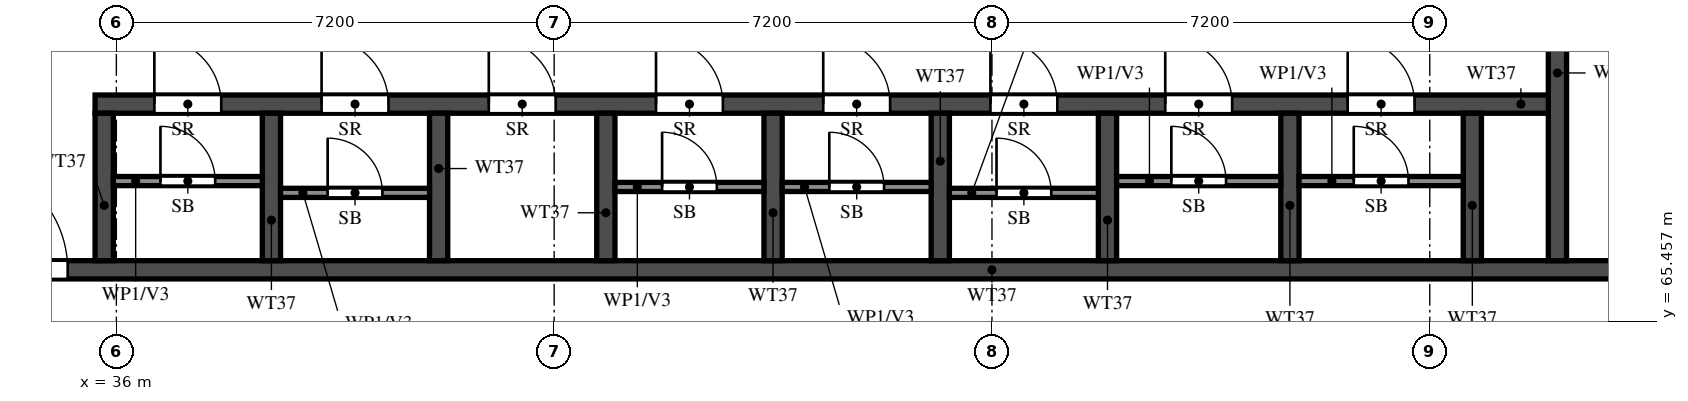
"""IFC4 building model, lengths in metres.
Left out: names, types, materials, properties, quantities, classifications, styles, units other than length and angle.
Written with IfcOpenShell. Run it as: python <this file> out.ifc"""

import sys

from ifc_helpers import new_model, si_unit, direction, frame, frame_2d, origin, place, context, subcontext, project, spatial, rectangle, extrude, element, fill, save


model = new_model("IFC4")
c1 = context("Model", 3, precision=1e-05, world=origin(), true_north=direction((0.0, 1.0)))
c2 = subcontext(c1, "Body", "Model", "MODEL_VIEW")
j1 = project(units=[si_unit("LENGTHUNIT", "METRE"), si_unit("PLANEANGLEUNIT", "RADIAN")], contexts=[c1])
p1 = place(None, origin())
s1 = spatial("IfcSite", under=j1, at=p1, CompositionType="ELEMENT")
p2 = place(p1, origin())
s2 = spatial("IfcBuilding", under=s1, at=p2, CompositionType="ELEMENT")
p3 = place(p2, frame((0.0, 0.0, 232.5)))
s3 = spatial("IfcBuildingStorey", under=s2, at=p3, CompositionType="ELEMENT", Elevation=232.5)
p4 = place(p3, frame((29.2, 66.3, 0.0), z_axis=(0.0, 0.0, 1.0), x_axis=(1.0, 0.0, 0.0)))
e1 = element("IfcWall", 1, at=p4, inside=s3, PredefinedType="SHEAR", context=c2, shape_type="SweptSolid", body=[
    extrude(rectangle(XDim=42.4, YDim=0.3, at=frame_2d((21.2, 0.0))), origin(), (0.0, 0.0, 1.0), 3.22),
])
p5 = place(p4, frame((1.425, 0.0, 0.0)))
e2 = element("IfcOpeningElement", 2, at=p5, cuts=e1, PredefinedType="OPENING", context=c2, shape_type="SweptSolid", body=[
    extrude(rectangle(XDim=1.1, YDim=2.1, at=frame_2d((0.55, 1.05))), frame((0.0, 0.16, 0.0), z_axis=(0.0, -1.0, 0.0), x_axis=(1.0, 0.0, 0.0)), (0.0, 0.0, 1.0), 0.32),
])
p6 = place(p4, frame((4.2, 0.0, 0.0)))
e3 = element("IfcOpeningElement", 3, at=p6, cuts=e1, PredefinedType="OPENING", context=c2, shape_type="SweptSolid", body=[
    extrude(rectangle(XDim=1.8, YDim=2.1, at=frame_2d((0.9, 1.05))), frame((0.0, 0.16, 0.0), z_axis=(0.0, -1.0, 0.0), x_axis=(1.0, 0.0, 0.0)), (0.0, 0.0, 1.0), 0.32),
])
p7 = place(p3, frame((35.65, 69.025, 0.0), z_axis=(0.0, 0.0, 1.0), x_axis=(1.0, 0.0, 0.0)))
e4 = element("IfcWall", 4, at=p7, inside=s3, PredefinedType="SHEAR", context=c2, shape_type="SweptSolid", body=[
    extrude(rectangle(XDim=24.05, YDim=0.3, at=frame_2d((12.025, 0.0))), origin(), (0.0, 0.0, 1.0), 3.22),
])
p8 = place(p7, frame((0.975, 0.0, 0.0)))
e5 = element("IfcOpeningElement", 5, at=p8, cuts=e4, PredefinedType="OPENING", context=c2, shape_type="SweptSolid", body=[
    extrude(rectangle(XDim=1.1, YDim=2.1, at=frame_2d((0.55, 1.05))), frame((0.0, 0.16, 0.0), z_axis=(0.0, -1.0, 0.0), x_axis=(1.0, 0.0, 0.0)), (0.0, 0.0, 1.0), 0.32),
])
p9 = place(p7, frame((3.725, 0.0, 0.0)))
e6 = element("IfcOpeningElement", 6, at=p9, cuts=e4, PredefinedType="OPENING", context=c2, shape_type="SweptSolid", body=[
    extrude(rectangle(XDim=1.1, YDim=2.1, at=frame_2d((0.55, 1.05))), frame((0.0, 0.16, 0.0), z_axis=(0.0, -1.0, 0.0), x_axis=(1.0, 0.0, 0.0)), (0.0, 0.0, 1.0), 0.32),
])
p10 = place(p7, frame((6.475, 0.0, 0.0)))
e7 = element("IfcOpeningElement", 7, at=p10, cuts=e4, PredefinedType="OPENING", context=c2, shape_type="SweptSolid", body=[
    extrude(rectangle(XDim=1.1, YDim=2.1, at=frame_2d((0.55, 1.05))), frame((0.0, 0.16, 0.0), z_axis=(0.0, -1.0, 0.0), x_axis=(1.0, 0.0, 0.0)), (0.0, 0.0, 1.0), 0.32),
])
p11 = place(p7, frame((9.225, 0.0, 0.0)))
e8 = element("IfcOpeningElement", 8, at=p11, cuts=e4, PredefinedType="OPENING", context=c2, shape_type="SweptSolid", body=[
    extrude(rectangle(XDim=1.1, YDim=2.1, at=frame_2d((0.55, 1.05))), frame((0.0, 0.16, 0.0), z_axis=(0.0, -1.0, 0.0), x_axis=(1.0, 0.0, 0.0)), (0.0, 0.0, 1.0), 0.32),
])
p12 = place(p7, frame((11.975, 0.0, 0.0)))
e9 = element("IfcOpeningElement", 9, at=p12, cuts=e4, PredefinedType="OPENING", context=c2, shape_type="SweptSolid", body=[
    extrude(rectangle(XDim=1.1, YDim=2.1, at=frame_2d((0.55, 1.05))), frame((0.0, 0.16, 0.0), z_axis=(0.0, -1.0, 0.0), x_axis=(1.0, 0.0, 0.0)), (0.0, 0.0, 1.0), 0.32),
])
p13 = place(p7, frame((14.725, 0.0, 0.0)))
e10 = element("IfcOpeningElement", 10, at=p13, cuts=e4, PredefinedType="OPENING", context=c2, shape_type="SweptSolid", body=[
    extrude(rectangle(XDim=1.1, YDim=2.1, at=frame_2d((0.55, 1.05))), frame((0.0, 0.16, 0.0), z_axis=(0.0, -1.0, 0.0), x_axis=(1.0, 0.0, 0.0)), (0.0, 0.0, 1.0), 0.32),
])
p14 = place(p7, frame((17.6, 0.0, 0.0)))
e11 = element("IfcOpeningElement", 11, at=p14, cuts=e4, PredefinedType="OPENING", context=c2, shape_type="SweptSolid", body=[
    extrude(rectangle(XDim=1.1, YDim=2.1, at=frame_2d((0.55, 1.05))), frame((0.0, 0.16, 0.0), z_axis=(0.0, -1.0, 0.0), x_axis=(1.0, 0.0, 0.0)), (0.0, 0.0, 1.0), 0.32),
])
p15 = place(p7, frame((20.6, 0.0, 0.0)))
e12 = element("IfcOpeningElement", 12, at=p15, cuts=e4, PredefinedType="OPENING", context=c2, shape_type="SweptSolid", body=[
    extrude(rectangle(XDim=1.1, YDim=2.1, at=frame_2d((0.55, 1.05))), frame((0.0, 0.16, 0.0), z_axis=(0.0, -1.0, 0.0), x_axis=(1.0, 0.0, 0.0)), (0.0, 0.0, 1.0), 0.32),
])
p16 = place(p3, frame((59.7, 66.45, 0.0), z_axis=(0.0, 0.0, 1.0), x_axis=(0.0, 1.0, 0.0)))
e13 = element("IfcWall", 13, at=p16, inside=s3, PredefinedType="SHEAR", context=c2, shape_type="SweptSolid", body=[
    extrude(rectangle(XDim=6.175, YDim=0.3, at=frame_2d((3.087, 0.0))), origin(), (0.0, 0.0, 1.0), 3.22),
])
p17 = place(p16, frame((3.85, 0.0, 0.0)))
e14 = element("IfcOpeningElement", 14, at=p17, cuts=e13, PredefinedType="OPENING", context=c2, shape_type="SweptSolid", body=[
    extrude(rectangle(XDim=1.2, YDim=2.1, at=frame_2d((0.6, 1.05))), frame((0.0, 0.16, 0.0), z_axis=(0.0, -1.0, 0.0), x_axis=(1.0, 0.0, 0.0)), (0.0, 0.0, 1.0), 0.32),
])
for number, where, z_axis, x_axis in (
    (15, (35.8, 66.45, 0.0), (0.0, 0.0, 1.0), (0.0, 1.0, 0.0)),
    (16, (38.55, 66.45, 0.0), (0.0, 0.0, 1.0), (0.0, 1.0, 0.0)),
    (17, (41.3, 66.45, 0.0), (0.0, 0.0, 1.0), (0.0, 1.0, 0.0)),
    (18, (44.05, 66.45, 0.0), (0.0, 0.0, 1.0), (0.0, 1.0, 0.0)),
    (19, (46.8, 66.45, 0.0), (0.0, 0.0, 1.0), (0.0, 1.0, 0.0)),
    (20, (49.55, 66.45, 0.0), (0.0, 0.0, 1.0), (0.0, 1.0, 0.0)),
    (21, (52.3, 66.45, 0.0), (0.0, 0.0, 1.0), (0.0, 1.0, 0.0)),
    (22, (55.3, 66.45, 0.0), (0.0, 0.0, 1.0), (0.0, 1.0, 0.0)),
    (23, (58.3, 66.45, 0.0), (0.0, 0.0, 1.0), (0.0, 1.0, 0.0)),
):
    element("IfcWall", number, at=place(p3, frame(where, z_axis=z_axis, x_axis=x_axis)), inside=s3, PredefinedType="SHEAR", context=c2, shape_type="SweptSolid", body=[
        extrude(rectangle(XDim=2.425, YDim=0.3, at=frame_2d((1.212, 0.0))), origin(), (0.0, 0.0, 1.0), 3.22),
    ])
p18 = place(p3, frame((35.95, 67.76, 0.0), z_axis=(0.0, 0.0, 1.0), x_axis=(1.0, 0.0, 0.0)))
e24 = element("IfcWall", 24, at=p18, inside=s3, PredefinedType="PARTITIONING", context=c2, shape_type="SweptSolid", body=[
    extrude(rectangle(XDim=2.45, YDim=0.15, at=frame_2d((1.225, 0.0))), origin(), (0.0, 0.0, 1.0), 3.22),
])
p19 = place(p18, frame((0.775, 0.0, 0.0)))
e25 = element("IfcOpeningElement", 25, at=p19, cuts=e24, PredefinedType="OPENING", context=c2, shape_type="SweptSolid", body=[
    extrude(rectangle(XDim=0.9, YDim=2.1, at=frame_2d((0.45, 1.05))), frame((0.0, 0.085, 0.0), z_axis=(0.0, -1.0, 0.0), x_axis=(1.0, 0.0, 0.0)), (0.0, 0.0, 1.0), 0.17),
])
p20 = place(p3, frame((38.7, 67.565, 0.0), z_axis=(0.0, 0.0, 1.0), x_axis=(1.0, 0.0, 0.0)))
e26 = element("IfcWall", 26, at=p20, inside=s3, PredefinedType="PARTITIONING", context=c2, shape_type="SweptSolid", body=[
    extrude(rectangle(XDim=2.45, YDim=0.15, at=frame_2d((1.225, 0.0))), origin(), (0.0, 0.0, 1.0), 3.22),
])
p21 = place(p20, frame((0.775, 0.0, 0.0)))
e27 = element("IfcOpeningElement", 27, at=p21, cuts=e26, PredefinedType="OPENING", context=c2, shape_type="SweptSolid", body=[
    extrude(rectangle(XDim=0.9, YDim=2.1, at=frame_2d((0.45, 1.05))), frame((0.0, 0.085, 0.0), z_axis=(0.0, -1.0, 0.0), x_axis=(1.0, 0.0, 0.0)), (0.0, 0.0, 1.0), 0.17),
])
p22 = place(p3, frame((44.2, 67.663, 0.0), z_axis=(0.0, 0.0, 1.0), x_axis=(1.0, 0.0, 0.0)))
e28 = element("IfcWall", 28, at=p22, inside=s3, PredefinedType="PARTITIONING", context=c2, shape_type="SweptSolid", body=[
    extrude(rectangle(XDim=2.45, YDim=0.15, at=frame_2d((1.225, 0.0))), origin(), (0.0, 0.0, 1.0), 3.22),
])
p23 = place(p22, frame((0.775, 0.0, 0.0)))
e29 = element("IfcOpeningElement", 29, at=p23, cuts=e28, PredefinedType="OPENING", context=c2, shape_type="SweptSolid", body=[
    extrude(rectangle(XDim=0.9, YDim=2.1, at=frame_2d((0.45, 1.05))), frame((0.0, 0.085, 0.0), z_axis=(0.0, -1.0, 0.0), x_axis=(1.0, 0.0, 0.0)), (0.0, 0.0, 1.0), 0.17),
])
p24 = place(p3, frame((46.95, 67.663, 0.0), z_axis=(0.0, 0.0, 1.0), x_axis=(1.0, 0.0, 0.0)))
e30 = element("IfcWall", 30, at=p24, inside=s3, PredefinedType="PARTITIONING", context=c2, shape_type="SweptSolid", body=[
    extrude(rectangle(XDim=2.45, YDim=0.15, at=frame_2d((1.225, 0.0))), origin(), (0.0, 0.0, 1.0), 3.22),
])
p25 = place(p24, frame((0.775, 0.0, 0.0)))
e31 = element("IfcOpeningElement", 31, at=p25, cuts=e30, PredefinedType="OPENING", context=c2, shape_type="SweptSolid", body=[
    extrude(rectangle(XDim=0.9, YDim=2.1, at=frame_2d((0.45, 1.05))), frame((0.0, 0.085, 0.0), z_axis=(0.0, -1.0, 0.0), x_axis=(1.0, 0.0, 0.0)), (0.0, 0.0, 1.0), 0.17),
])
p26 = place(p3, frame((49.7, 67.565, 0.0), z_axis=(0.0, 0.0, 1.0), x_axis=(1.0, 0.0, 0.0)))
e32 = element("IfcWall", 32, at=p26, inside=s3, PredefinedType="PARTITIONING", context=c2, shape_type="SweptSolid", body=[
    extrude(rectangle(XDim=2.45, YDim=0.15, at=frame_2d((1.225, 0.0))), origin(), (0.0, 0.0, 1.0), 3.22),
])
p27 = place(p26, frame((0.775, 0.0, 0.0)))
e33 = element("IfcOpeningElement", 33, at=p27, cuts=e32, PredefinedType="OPENING", context=c2, shape_type="SweptSolid", body=[
    extrude(rectangle(XDim=0.9, YDim=2.1, at=frame_2d((0.45, 1.05))), frame((0.0, 0.085, 0.0), z_axis=(0.0, -1.0, 0.0), x_axis=(1.0, 0.0, 0.0)), (0.0, 0.0, 1.0), 0.17),
])
p28 = place(p3, frame((52.45, 67.76, 0.0), z_axis=(0.0, 0.0, 1.0), x_axis=(1.0, 0.0, 0.0)))
e34 = element("IfcWall", 34, at=p28, inside=s3, PredefinedType="PARTITIONING", context=c2, shape_type="SweptSolid", body=[
    extrude(rectangle(XDim=2.7, YDim=0.15, at=frame_2d((1.35, 0.0))), origin(), (0.0, 0.0, 1.0), 3.22),
])
p29 = place(p28, frame((0.9, 0.0, 0.0)))
e35 = element("IfcOpeningElement", 35, at=p29, cuts=e34, PredefinedType="OPENING", context=c2, shape_type="SweptSolid", body=[
    extrude(rectangle(XDim=0.9, YDim=2.1, at=frame_2d((0.45, 1.05))), frame((0.0, 0.085, 0.0), z_axis=(0.0, -1.0, 0.0), x_axis=(1.0, 0.0, 0.0)), (0.0, 0.0, 1.0), 0.17),
])
p30 = place(p3, frame((55.45, 67.76, 0.0), z_axis=(0.0, 0.0, 1.0), x_axis=(1.0, 0.0, 0.0)))
e36 = element("IfcWall", 36, at=p30, inside=s3, PredefinedType="PARTITIONING", context=c2, shape_type="SweptSolid", body=[
    extrude(rectangle(XDim=2.7, YDim=0.15, at=frame_2d((1.35, 0.0))), origin(), (0.0, 0.0, 1.0), 3.22),
])
p31 = place(p30, frame((0.9, 0.0, 0.0)))
e37 = element("IfcOpeningElement", 37, at=p31, cuts=e36, PredefinedType="OPENING", context=c2, shape_type="SweptSolid", body=[
    extrude(rectangle(XDim=0.9, YDim=2.1, at=frame_2d((0.45, 1.05))), frame((0.0, 0.085, 0.0), z_axis=(0.0, -1.0, 0.0), x_axis=(1.0, 0.0, 0.0)), (0.0, 0.0, 1.0), 0.17),
])
p32 = place(p6, origin())
e38 = element("IfcDoor", 38, at=p32, inside=s3, OperationType="DOUBLE_DOOR_SINGLE_SWING", PredefinedType="DOOR", context=c2, shape_type="SweptSolid", body=[
    extrude(rectangle(XDim=1.8, YDim=2.1, at=frame_2d((0.9, 1.05))), frame((0.0, 0.025, 0.0), z_axis=(0.0, -1.0, 0.0), x_axis=(1.0, 0.0, 0.0)), (0.0, 0.0, 1.0), 0.05),
])
fill(e3, e38)
p33 = place(p8, origin())
e39 = element("IfcDoor", 39, at=p33, inside=s3, OperationType="SINGLE_SWING_RIGHT", PredefinedType="DOOR", context=c2, shape_type="SweptSolid", body=[
    extrude(rectangle(XDim=1.1, YDim=2.1, at=frame_2d((0.55, 1.05))), frame((0.0, 0.025, 0.0), z_axis=(0.0, -1.0, 0.0), x_axis=(1.0, 0.0, 0.0)), (0.0, 0.0, 1.0), 0.05),
])
fill(e5, e39)
p34 = place(p19, origin())
e40 = element("IfcDoor", 40, at=p34, inside=s3, OperationType="SINGLE_SWING_LEFT", PredefinedType="DOOR", context=c2, shape_type="SweptSolid", body=[
    extrude(rectangle(XDim=0.9, YDim=2.1, at=frame_2d((0.45, 1.05))), frame((0.0, 0.025, 0.0), z_axis=(0.0, -1.0, 0.0), x_axis=(1.0, 0.0, 0.0)), (0.0, 0.0, 1.0), 0.05),
])
fill(e25, e40)
p35 = place(p9, origin())
e41 = element("IfcDoor", 41, at=p35, inside=s3, OperationType="SINGLE_SWING_LEFT", PredefinedType="DOOR", context=c2, shape_type="SweptSolid", body=[
    extrude(rectangle(XDim=1.1, YDim=2.1, at=frame_2d((0.55, 1.05))), frame((0.0, 0.025, 0.0), z_axis=(0.0, -1.0, 0.0), x_axis=(1.0, 0.0, 0.0)), (0.0, 0.0, 1.0), 0.05),
])
fill(e6, e41)
p36 = place(p21, origin())
e42 = element("IfcDoor", 42, at=p36, inside=s3, OperationType="SINGLE_SWING_LEFT", PredefinedType="DOOR", context=c2, shape_type="SweptSolid", body=[
    extrude(rectangle(XDim=0.9, YDim=2.1, at=frame_2d((0.45, 1.05))), frame((0.0, 0.025, 0.0), z_axis=(0.0, -1.0, 0.0), x_axis=(1.0, 0.0, 0.0)), (0.0, 0.0, 1.0), 0.05),
])
fill(e27, e42)
p37 = place(p10, origin())
e43 = element("IfcDoor", 43, at=p37, inside=s3, OperationType="SINGLE_SWING_RIGHT", PredefinedType="DOOR", context=c2, shape_type="SweptSolid", body=[
    extrude(rectangle(XDim=1.1, YDim=2.1, at=frame_2d((0.55, 1.05))), frame((0.0, 0.025, 0.0), z_axis=(0.0, -1.0, 0.0), x_axis=(1.0, 0.0, 0.0)), (0.0, 0.0, 1.0), 0.05),
])
fill(e7, e43)
p38 = place(p11, origin())
e44 = element("IfcDoor", 44, at=p38, inside=s3, OperationType="SINGLE_SWING_LEFT", PredefinedType="DOOR", context=c2, shape_type="SweptSolid", body=[
    extrude(rectangle(XDim=1.1, YDim=2.1, at=frame_2d((0.55, 1.05))), frame((0.0, 0.025, 0.0), z_axis=(0.0, -1.0, 0.0), x_axis=(1.0, 0.0, 0.0)), (0.0, 0.0, 1.0), 0.05),
])
fill(e8, e44)
p39 = place(p23, origin())
e45 = element("IfcDoor", 45, at=p39, inside=s3, OperationType="SINGLE_SWING_LEFT", PredefinedType="DOOR", context=c2, shape_type="SweptSolid", body=[
    extrude(rectangle(XDim=0.9, YDim=2.1, at=frame_2d((0.45, 1.05))), frame((0.0, 0.025, 0.0), z_axis=(0.0, -1.0, 0.0), x_axis=(1.0, 0.0, 0.0)), (0.0, 0.0, 1.0), 0.05),
])
fill(e29, e45)
p40 = place(p12, origin())
e46 = element("IfcDoor", 46, at=p40, inside=s3, OperationType="SINGLE_SWING_RIGHT", PredefinedType="DOOR", context=c2, shape_type="SweptSolid", body=[
    extrude(rectangle(XDim=1.1, YDim=2.1, at=frame_2d((0.55, 1.05))), frame((0.0, 0.025, 0.0), z_axis=(0.0, -1.0, 0.0), x_axis=(1.0, 0.0, 0.0)), (0.0, 0.0, 1.0), 0.05),
])
fill(e9, e46)
p41 = place(p25, origin())
e47 = element("IfcDoor", 47, at=p41, inside=s3, OperationType="SINGLE_SWING_RIGHT", PredefinedType="DOOR", context=c2, shape_type="SweptSolid", body=[
    extrude(rectangle(XDim=0.9, YDim=2.1, at=frame_2d((0.45, 1.05))), frame((0.0, 0.025, 0.0), z_axis=(0.0, -1.0, 0.0), x_axis=(1.0, 0.0, 0.0)), (0.0, 0.0, 1.0), 0.05),
])
fill(e31, e47)
p42 = place(p13, origin())
e48 = element("IfcDoor", 48, at=p42, inside=s3, OperationType="SINGLE_SWING_LEFT", PredefinedType="DOOR", context=c2, shape_type="SweptSolid", body=[
    extrude(rectangle(XDim=1.1, YDim=2.1, at=frame_2d((0.55, 1.05))), frame((0.0, 0.025, 0.0), z_axis=(0.0, -1.0, 0.0), x_axis=(1.0, 0.0, 0.0)), (0.0, 0.0, 1.0), 0.05),
])
fill(e10, e48)
p43 = place(p27, origin())
e49 = element("IfcDoor", 49, at=p43, inside=s3, OperationType="SINGLE_SWING_LEFT", PredefinedType="DOOR", context=c2, shape_type="SweptSolid", body=[
    extrude(rectangle(XDim=0.9, YDim=2.1, at=frame_2d((0.45, 1.05))), frame((0.0, 0.025, 0.0), z_axis=(0.0, -1.0, 0.0), x_axis=(1.0, 0.0, 0.0)), (0.0, 0.0, 1.0), 0.05),
])
fill(e33, e49)
p44 = place(p14, origin())
e50 = element("IfcDoor", 50, at=p44, inside=s3, OperationType="SINGLE_SWING_RIGHT", PredefinedType="DOOR", context=c2, shape_type="SweptSolid", body=[
    extrude(rectangle(XDim=1.1, YDim=2.1, at=frame_2d((0.55, 1.05))), frame((0.0, 0.025, 0.0), z_axis=(0.0, -1.0, 0.0), x_axis=(1.0, 0.0, 0.0)), (0.0, 0.0, 1.0), 0.05),
])
fill(e11, e50)
p45 = place(p29, origin())
e51 = element("IfcDoor", 51, at=p45, inside=s3, OperationType="SINGLE_SWING_LEFT", PredefinedType="DOOR", context=c2, shape_type="SweptSolid", body=[
    extrude(rectangle(XDim=0.9, YDim=2.1, at=frame_2d((0.45, 1.05))), frame((0.0, 0.025, 0.0), z_axis=(0.0, -1.0, 0.0), x_axis=(1.0, 0.0, 0.0)), (0.0, 0.0, 1.0), 0.05),
])
fill(e35, e51)
p46 = place(p15, origin())
e52 = element("IfcDoor", 52, at=p46, inside=s3, OperationType="SINGLE_SWING_RIGHT", PredefinedType="DOOR", context=c2, shape_type="SweptSolid", body=[
    extrude(rectangle(XDim=1.1, YDim=2.1, at=frame_2d((0.55, 1.05))), frame((0.0, 0.025, 0.0), z_axis=(0.0, -1.0, 0.0), x_axis=(1.0, 0.0, 0.0)), (0.0, 0.0, 1.0), 0.05),
])
fill(e12, e52)
p47 = place(p31, origin())
e53 = element("IfcDoor", 53, at=p47, inside=s3, OperationType="SINGLE_SWING_LEFT", PredefinedType="DOOR", context=c2, shape_type="SweptSolid", body=[
    extrude(rectangle(XDim=0.9, YDim=2.1, at=frame_2d((0.45, 1.05))), frame((0.0, 0.025, 0.0), z_axis=(0.0, -1.0, 0.0), x_axis=(1.0, 0.0, 0.0)), (0.0, 0.0, 1.0), 0.05),
])
fill(e37, e53)
save(model, sys.argv[1])
